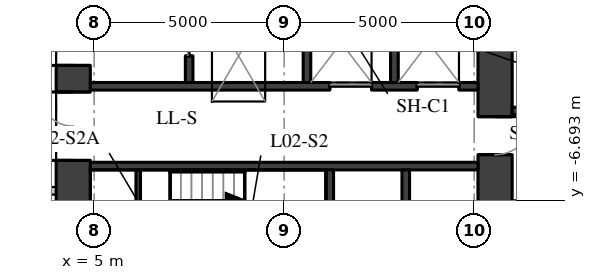
"""IFC4 building model, lengths in metres.
Left out: names, types, materials, properties, quantities, classifications, styles, units other than length and angle.
Written with IfcOpenShell. Run it as: python <this file> out.ifc"""

import sys

from ifc_helpers import new_model, si_unit, direction, frame, frame_2d, origin, place, context, subcontext, project, spatial, rectangle, extrude, element, fill, save


model = new_model("IFC4")
c1 = context("Model", 3, precision=1e-05, world=origin(), true_north=direction((0.0, 1.0)))
c2 = subcontext(c1, "Body", "Model", "MODEL_VIEW")
j1 = project(units=[si_unit("LENGTHUNIT", "METRE"), si_unit("PLANEANGLEUNIT", "RADIAN")], contexts=[c1])
p1 = place(None, origin())
s1 = spatial("IfcSite", under=j1, at=p1, CompositionType="ELEMENT")
p2 = place(p1, origin())
s2 = spatial("IfcBuilding", under=s1, at=p2, CompositionType="ELEMENT")
p3 = place(p2, frame((0.0, 0.0, 12.5)))
s3 = spatial("IfcBuildingStorey", under=s2, at=p3, CompositionType="ELEMENT", Elevation=12.5)
p4 = place(p3, frame((4.45, -11.1, 0.0), z_axis=(0.0, 0.0, 1.0), x_axis=(0.0, 1.0, 0.0)))
e1 = element("IfcWall", 1, at=p4, inside=s3, PredefinedType="SHEAR", context=c2, shape_type="SweptSolid", body=[
    extrude(rectangle(XDim=22.2, YDim=0.9, at=frame_2d((11.1, 0.0))), origin(), (0.0, 0.0, 1.0), 4.65),
])
p5 = place(p4, frame((2.35, 0.0, 0.0)))
e2 = element("IfcOpeningElement", 2, at=p5, cuts=e1, PredefinedType="OPENING", context=c2, shape_type="SweptSolid", body=[
    extrude(rectangle(XDim=1.5, YDim=2.1, at=frame_2d((0.75, 1.05))), frame((0.0, 0.46, 0.0), z_axis=(0.0, -1.0, 0.0), x_axis=(1.0, 0.0, 0.0)), (0.0, 0.0, 1.0), 0.92),
])
p6 = place(p4, frame((5.45, 0.0, 0.0)))
e3 = element("IfcOpeningElement", 3, at=p6, cuts=e1, PredefinedType="OPENING", context=c2, shape_type="SweptSolid", body=[
    extrude(rectangle(XDim=1.8, YDim=2.1, at=frame_2d((0.9, 1.05))), frame((0.0, 0.46, 0.0), z_axis=(0.0, -1.0, 0.0), x_axis=(1.0, 0.0, 0.0)), (0.0, 0.0, 1.0), 0.92),
])
p7 = place(p4, frame((7.95, 0.0, 0.0)))
e4 = element("IfcOpeningElement", 4, at=p7, cuts=e1, PredefinedType="OPENING", context=c2, shape_type="SweptSolid", body=[
    extrude(rectangle(XDim=1.1, YDim=2.1, at=frame_2d((0.55, 1.05))), frame((0.0, 0.46, 0.0), z_axis=(0.0, -1.0, 0.0), x_axis=(1.0, 0.0, 0.0)), (0.0, 0.0, 1.0), 0.92),
])
p8 = place(p4, frame((10.6, 0.0, 0.0)))
e5 = element("IfcOpeningElement", 5, at=p8, cuts=e1, PredefinedType="OPENING", context=c2, shape_type="SweptSolid", body=[
    extrude(rectangle(XDim=1.0, YDim=2.1, at=frame_2d((0.5, 1.05))), frame((0.0, 0.46, 0.0), z_axis=(0.0, -1.0, 0.0), x_axis=(1.0, 0.0, 0.0)), (0.0, 0.0, 1.0), 0.92),
])
p9 = place(p4, frame((13.15, 0.0, 0.0)))
e6 = element("IfcOpeningElement", 6, at=p9, cuts=e1, PredefinedType="OPENING", context=c2, shape_type="SweptSolid", body=[
    extrude(rectangle(XDim=1.1, YDim=2.1, at=frame_2d((0.55, 1.05))), frame((0.0, 0.46, 0.0), z_axis=(0.0, -1.0, 0.0), x_axis=(1.0, 0.0, 0.0)), (0.0, 0.0, 1.0), 0.92),
])
p10 = place(p4, frame((14.95, 0.0, 0.0)))
e7 = element("IfcOpeningElement", 7, at=p10, cuts=e1, PredefinedType="OPENING", context=c2, shape_type="SweptSolid", body=[
    extrude(rectangle(XDim=1.8, YDim=2.1, at=frame_2d((0.9, 1.05))), frame((0.0, 0.46, 0.0), z_axis=(0.0, -1.0, 0.0), x_axis=(1.0, 0.0, 0.0)), (0.0, 0.0, 1.0), 0.92),
])
p11 = place(p4, frame((18.35, 0.0, 0.0)))
e8 = element("IfcOpeningElement", 8, at=p11, cuts=e1, PredefinedType="OPENING", context=c2, shape_type="SweptSolid", body=[
    extrude(rectangle(XDim=1.5, YDim=2.1, at=frame_2d((0.75, 1.05))), frame((0.0, 0.46, 0.0), z_axis=(0.0, -1.0, 0.0), x_axis=(1.0, 0.0, 0.0)), (0.0, 0.0, 1.0), 0.92),
])
p12 = place(p3, frame((15.55, -11.1, 0.0), z_axis=(0.0, 0.0, 1.0), x_axis=(0.0, 1.0, 0.0)))
e9 = element("IfcWall", 9, at=p12, inside=s3, PredefinedType="SHEAR", context=c2, shape_type="SweptSolid", body=[
    extrude(rectangle(XDim=22.2, YDim=0.9, at=frame_2d((11.1, 0.0))), origin(), (0.0, 0.0, 1.0), 4.65),
])
p13 = place(p12, frame((15.6, 0.0, 0.0)))
e10 = element("IfcOpeningElement", 10, at=p13, cuts=e9, PredefinedType="OPENING", context=c2, shape_type="SweptSolid", body=[
    extrude(rectangle(XDim=1.0, YDim=2.1, at=frame_2d((0.5, 1.05))), frame((0.0, 0.46, 0.0), z_axis=(0.0, -1.0, 0.0), x_axis=(1.0, 0.0, 0.0)), (0.0, 0.0, 1.0), 0.92),
])
p14 = place(p12, frame((5.6, 0.0, 0.0)))
e11 = element("IfcOpeningElement", 11, at=p14, cuts=e9, PredefinedType="OPENING", context=c2, shape_type="SweptSolid", body=[
    extrude(rectangle(XDim=1.0, YDim=2.1, at=frame_2d((0.5, 1.05))), frame((0.0, 0.46, 0.0), z_axis=(0.0, -1.0, 0.0), x_axis=(1.0, 0.0, 0.0)), (0.0, 0.0, 1.0), 0.92),
])
p15 = place(p3, frame((4.9, -3.7, 0.0), z_axis=(0.0, 0.0, 1.0), x_axis=(1.0, 0.0, 0.0)))
e12 = element("IfcWall", 12, at=p15, inside=s3, PredefinedType="SHEAR", context=c2, shape_type="SweptSolid", body=[
    extrude(rectangle(XDim=10.2, YDim=0.2, at=frame_2d((5.1, 0.0))), origin(), (0.0, 0.0, 1.0), 4.65),
])
p16 = place(p15, frame((6.3, 0.0, 0.0)))
e13 = element("IfcOpeningElement", 13, at=p16, cuts=e12, PredefinedType="OPENING", context=c2, shape_type="SweptSolid", body=[
    extrude(rectangle(XDim=1.1, YDim=2.1, at=frame_2d((0.55, 1.05))), frame((0.0, 0.11, 0.0), z_axis=(0.0, -1.0, 0.0), x_axis=(1.0, 0.0, 0.0)), (0.0, 0.0, 1.0), 0.22),
])
p17 = place(p15, frame((8.6, 0.0, 0.0)))
e14 = element("IfcOpeningElement", 14, at=p17, cuts=e12, PredefinedType="OPENING", context=c2, shape_type="SweptSolid", body=[
    extrude(rectangle(XDim=1.1, YDim=2.1, at=frame_2d((0.55, 1.05))), frame((0.0, 0.11, 0.0), z_axis=(0.0, -1.0, 0.0), x_axis=(1.0, 0.0, 0.0)), (0.0, 0.0, 1.0), 0.22),
])
p18 = place(p3, frame((4.9, -5.8, 0.0), z_axis=(0.0, 0.0, 1.0), x_axis=(1.0, 0.0, 0.0)))
e15 = element("IfcWall", 15, at=p18, inside=s3, PredefinedType="SHEAR", context=c2, shape_type="SweptSolid", body=[
    extrude(rectangle(XDim=10.2, YDim=0.2, at=frame_2d((5.1, 0.0))), origin(), (0.0, 0.0, 1.0), 4.65),
])
for number, where, z_axis, x_axis in (
    (16, (11.2, -9.1, 0.0), (0.0, 0.0, 1.0), (0.0, 1.0, 0.0)),
    (17, (13.2, -9.1, 0.0), (0.0, 0.0, 1.0), (0.0, 1.0, 0.0)),
):
    element("IfcWall", number, at=place(p3, frame(where, z_axis=z_axis, x_axis=x_axis)), inside=s3, PredefinedType="SHEAR", context=c2, shape_type="SweptSolid", body=[
        extrude(rectangle(XDim=3.2, YDim=0.2, at=frame_2d((1.6, 0.0))), origin(), (0.0, 0.0, 1.0), 4.65),
    ])
p19 = place(p3, frame((7.5, -3.6, 0.0), z_axis=(0.0, 0.0, 1.0), x_axis=(0.0, 1.0, 0.0)))
e18 = element("IfcWall", 18, at=p19, inside=s3, PredefinedType="SHEAR", context=c2, shape_type="SweptSolid", body=[
    extrude(rectangle(XDim=2.5, YDim=0.2, at=frame_2d((1.25, 0.0))), origin(), (0.0, 0.0, 1.0), 4.65),
])
p20 = place(p19, frame((0.7, 0.0, 0.0)))
e19 = element("IfcOpeningElement", 19, at=p20, cuts=e18, PredefinedType="OPENING", context=c2, shape_type="SweptSolid", body=[
    extrude(rectangle(XDim=1.1, YDim=2.1, at=frame_2d((0.55, 1.05))), frame((0.0, 0.11, 0.0), z_axis=(0.0, -1.0, 0.0), x_axis=(1.0, 0.0, 0.0)), (0.0, 0.0, 1.0), 0.22),
])
for number, where, z_axis, x_axis in (
    (20, (10.6, -3.6, 0.0), (0.0, 0.0, 1.0), (0.0, 1.0, 0.0)),
    (21, (12.9, -3.6, 0.0), (0.0, 0.0, 1.0), (0.0, 1.0, 0.0)),
):
    element("IfcWall", number, at=place(p3, frame(where, z_axis=z_axis, x_axis=x_axis)), inside=s3, PredefinedType="SHEAR", context=c2, shape_type="SweptSolid", body=[
        extrude(rectangle(XDim=2.5, YDim=0.2, at=frame_2d((1.25, 0.0))), origin(), (0.0, 0.0, 1.0), 4.65),
    ])
p21 = place(p3, frame((6.16, -9.1, 0.0), z_axis=(0.0, 0.0, 1.0), x_axis=(0.0, 1.0, 0.0)))
e22 = element("IfcWall", 22, at=p21, inside=s3, PredefinedType="SHEAR", context=c2, shape_type="SweptSolid", body=[
    extrude(rectangle(XDim=3.2, YDim=0.12, at=frame_2d((1.6, 0.0))), origin(), (0.0, 0.0, 1.0), 2.29),
])
p22 = place(p21, frame((0.85, 0.0, 0.0)))
e23 = element("IfcOpeningElement", 23, at=p22, cuts=e22, PredefinedType="OPENING", context=c2, shape_type="SweptSolid", body=[
    extrude(rectangle(XDim=1.5, YDim=2.1, at=frame_2d((0.75, 1.05))), frame((0.0, 0.07, 0.0), z_axis=(0.0, -1.0, 0.0), x_axis=(1.0, 0.0, 0.0)), (0.0, 0.0, 1.0), 0.14),
])
p23 = place(p3, frame((16.0, -4.35, 0.0), z_axis=(0.0, 0.0, 1.0), x_axis=(1.0, 0.0, 0.0)))
e24 = element("IfcWall", 24, at=p23, inside=s3, PredefinedType="SHEAR", context=c2, shape_type="SweptSolid", body=[
    extrude(rectangle(XDim=2.3, YDim=0.2, at=frame_2d((1.15, 0.0))), origin(), (0.0, 0.0, 1.0), 4.65),
])
p24 = place(p3, frame((-14.4, -6.45, 0.0), z_axis=(0.0, 0.0, 1.0), x_axis=(1.0, 0.0, 0.0)))
e25 = element("IfcWall", 25, at=p24, inside=s3, PredefinedType="PARTITIONING", context=c2, shape_type="SweptSolid", body=[
    extrude(rectangle(XDim=18.402, YDim=0.2, at=frame_2d((9.201, 0.0))), origin(), (0.0, 0.0, 1.0), 4.65),
])
p25 = place(p24, frame((8.001, 0.0, 0.0)))
e26 = element("IfcOpeningElement", 26, at=p25, cuts=e25, PredefinedType="OPENING", context=c2, shape_type="SweptSolid", body=[
    extrude(rectangle(XDim=2.4, YDim=2.4, at=frame_2d((1.2, 1.2))), frame((0.0, 0.11, 0.0), z_axis=(0.0, -1.0, 0.0), x_axis=(1.0, 0.0, 0.0)), (0.0, 0.0, 1.0), 0.22),
])
p26 = place(p6, origin())
e27 = element("IfcDoor", 27, at=p26, inside=s3, OperationType="DOUBLE_DOOR_SINGLE_SWING", PredefinedType="DOOR", context=c2, shape_type="SweptSolid", body=[
    extrude(rectangle(XDim=1.8, YDim=2.1, at=frame_2d((0.9, 1.05))), frame((0.0, 0.025, 0.0), z_axis=(0.0, -1.0, 0.0), x_axis=(1.0, 0.0, 0.0)), (0.0, 0.0, 1.0), 0.05),
])
fill(e3, e27)
p27 = place(p7, origin())
e28 = element("IfcDoor", 28, at=p27, inside=s3, OperationType="SINGLE_SWING_LEFT", PredefinedType="DOOR", context=c2, shape_type="SweptSolid", body=[
    extrude(rectangle(XDim=1.1, YDim=2.1, at=frame_2d((0.55, 1.05))), frame((0.0, 0.025, 0.0), z_axis=(0.0, -1.0, 0.0), x_axis=(1.0, 0.0, 0.0)), (0.0, 0.0, 1.0), 0.05),
])
fill(e4, e28)
p28 = place(p16, origin())
e29 = element("IfcDoor", 29, at=p28, inside=s3, OperationType="DOUBLE_DOOR_SLIDING", PredefinedType="DOOR", context=c2, shape_type="SweptSolid", body=[
    extrude(rectangle(XDim=1.1, YDim=2.1, at=frame_2d((0.55, 1.05))), frame((0.0, 0.025, 0.0), z_axis=(0.0, -1.0, 0.0), x_axis=(1.0, 0.0, 0.0)), (0.0, 0.0, 1.0), 0.05),
])
fill(e13, e29)
p29 = place(p17, origin())
e30 = element("IfcDoor", 30, at=p29, inside=s3, OperationType="DOUBLE_DOOR_SLIDING", PredefinedType="DOOR", context=c2, shape_type="SweptSolid", body=[
    extrude(rectangle(XDim=1.1, YDim=2.1, at=frame_2d((0.55, 1.05))), frame((0.0, 0.025, 0.0), z_axis=(0.0, -1.0, 0.0), x_axis=(1.0, 0.0, 0.0)), (0.0, 0.0, 1.0), 0.05),
])
fill(e14, e30)
p30 = place(p20, origin())
e31 = element("IfcDoor", 31, at=p30, inside=s3, OperationType="DOUBLE_DOOR_SLIDING", PredefinedType="DOOR", context=c2, shape_type="SweptSolid", body=[
    extrude(rectangle(XDim=1.1, YDim=2.1, at=frame_2d((0.55, 1.05))), frame((0.0, 0.025, 0.0), z_axis=(0.0, -1.0, 0.0), x_axis=(1.0, 0.0, 0.0)), (0.0, 0.0, 1.0), 0.05),
])
fill(e19, e31)
p31 = place(p14, origin())
e32 = element("IfcDoor", 32, at=p31, inside=s3, OperationType="SINGLE_SWING_LEFT", PredefinedType="DOOR", context=c2, shape_type="SweptSolid", body=[
    extrude(rectangle(XDim=1.0, YDim=2.1, at=frame_2d((0.5, 1.05))), frame((0.0, 0.025, 0.0), z_axis=(0.0, -1.0, 0.0), x_axis=(1.0, 0.0, 0.0)), (0.0, 0.0, 1.0), 0.05),
])
fill(e11, e32)
save(model, sys.argv[1])
